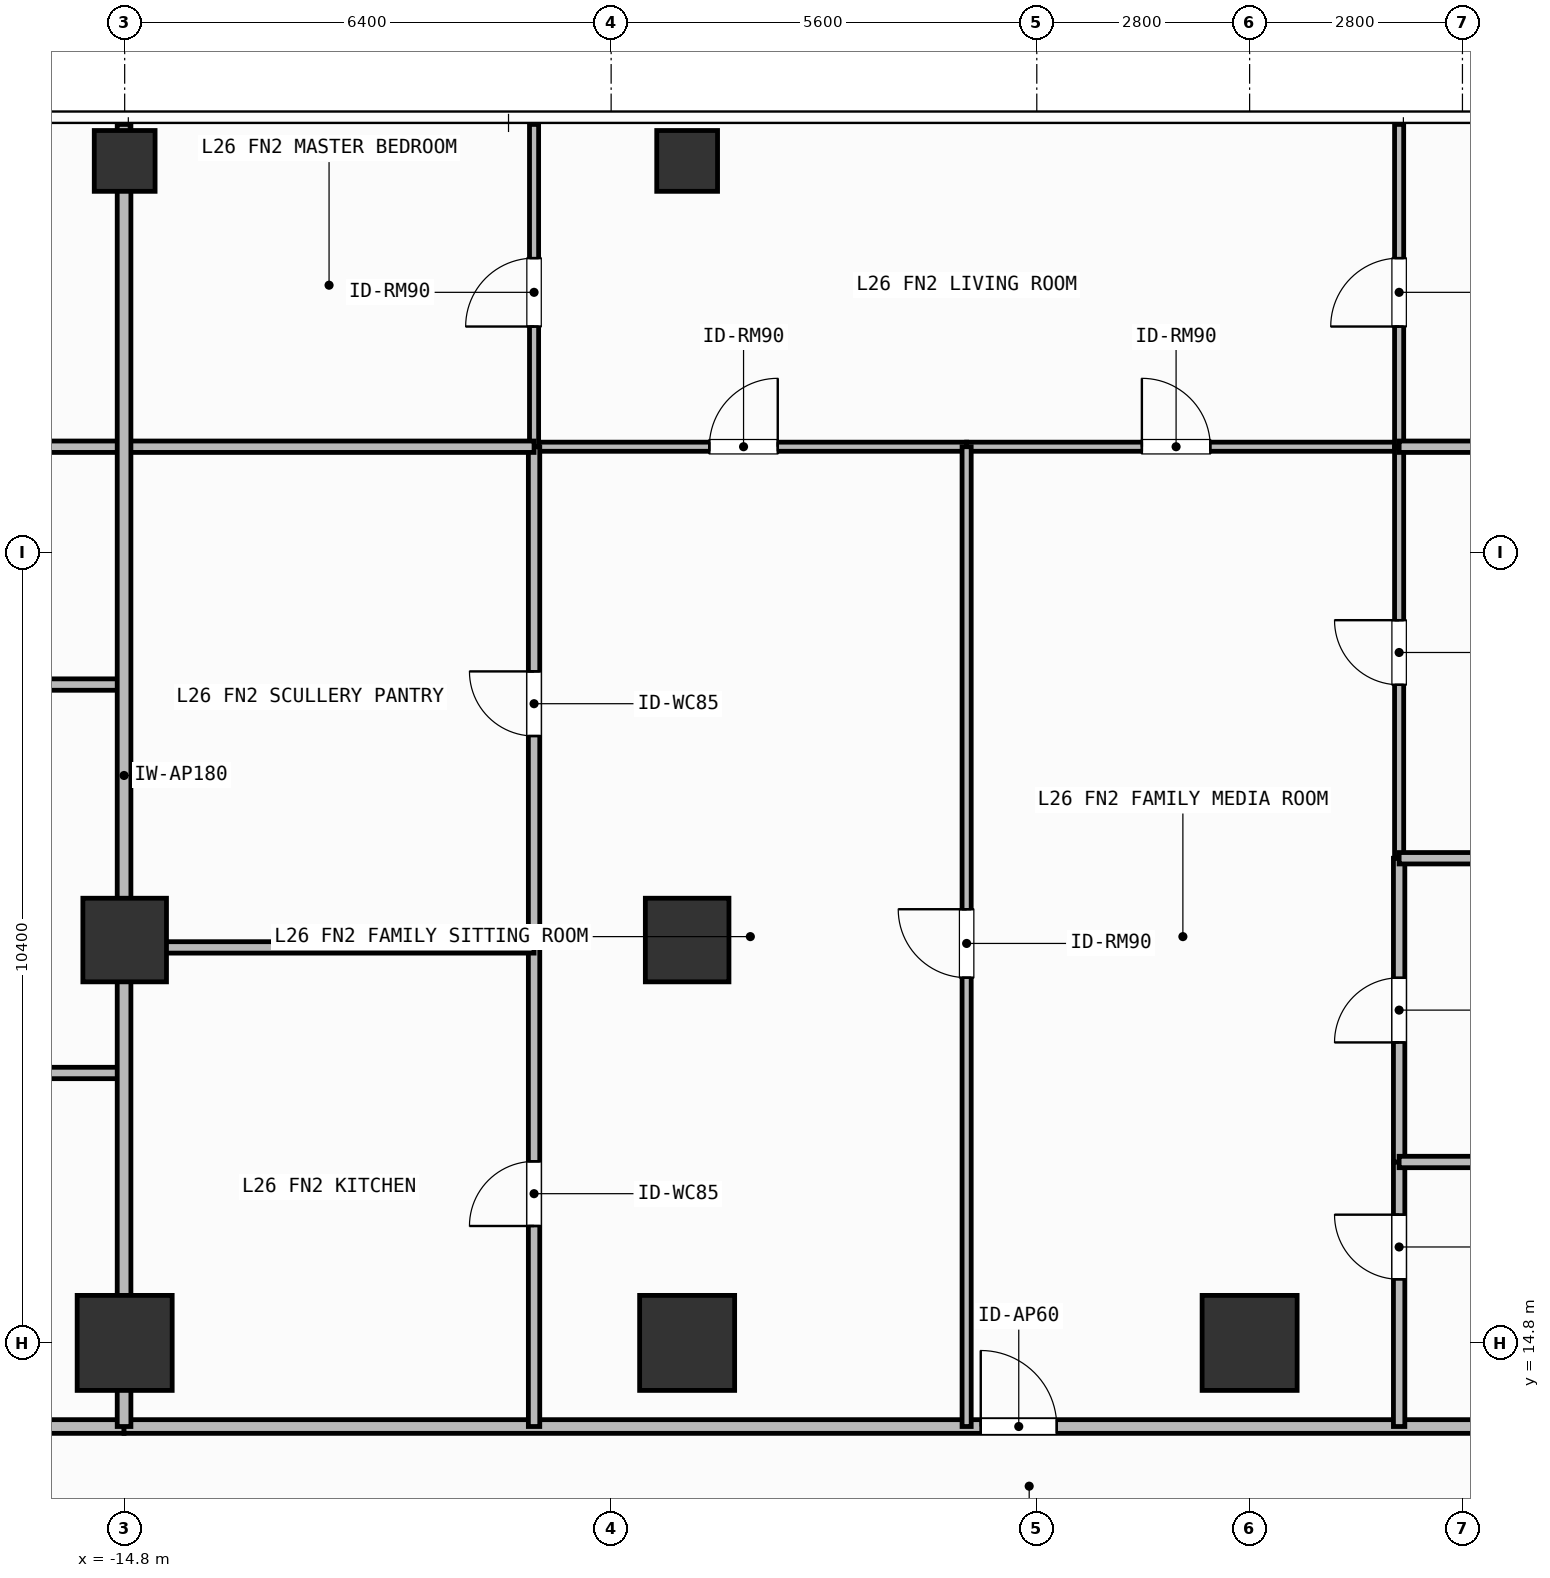
"""IFC4 building model, lengths in metres.
Left out: names, types, materials, properties, quantities, classifications, styles, units other than length and angle.
Written with IfcOpenShell. Run it as: python <this file> out.ifc"""

import sys

from ifc_helpers import new_model, si_unit, direction, frame, frame_2d, origin, origin_2d, place, context, subcontext, project, spatial, rectangle, hollow_rectangle, extrude, element, fill, save


model = new_model("IFC4")
c1 = context("Model", 3, precision=1e-05, world=origin(), true_north=direction((0.0, 1.0)))
c2 = subcontext(c1, "Body", "Model", "MODEL_VIEW")
j1 = project(units=[si_unit("LENGTHUNIT", "METRE"), si_unit("PLANEANGLEUNIT", "RADIAN")], contexts=[c1])
p1 = place(None, origin())
s1 = spatial("IfcSite", under=j1, at=p1, CompositionType="ELEMENT")
p2 = place(p1, origin())
s2 = spatial("IfcBuilding", under=s1, at=p2, CompositionType="ELEMENT")
p3 = place(p2, frame((0.0, 0.0, 104.7)))
s3 = spatial("IfcBuildingStorey", under=s2, at=p3, CompositionType="ELEMENT", Elevation=104.7)
for number, where, z_axis, x_axis in (
    (1, (-14.8, 14.8, 0.0), (0.0, 0.0, 1.0), (1.0, 0.0, 0.0)),
    (2, (-7.4, 14.8, 0.0), (0.0, 0.0, 1.0), (1.0, 0.0, 0.0)),
    (3, (0.0, 14.8, 0.0), (0.0, 0.0, 1.0), (1.0, 0.0, 0.0)),
):
    element("IfcColumn", number, at=place(p3, frame(where, z_axis=z_axis, x_axis=x_axis)), inside=s3, PredefinedType="COLUMN", context=c2, shape_type="SweptSolid", body=[
        extrude(rectangle(XDim=1.25, YDim=1.25, at=origin_2d()), origin(), (0.0, 0.0, 1.0), 3.9),
    ])
for number, where, z_axis, x_axis in (
    (4, (-14.8, 20.1, 0.0), (0.0, 0.0, 1.0), (1.0, 0.0, 0.0)),
    (5, (-7.4, 20.1, 0.0), (0.0, 0.0, 1.0), (1.0, 0.0, 0.0)),
):
    element("IfcColumn", number, at=place(p3, frame(where, z_axis=z_axis, x_axis=x_axis)), inside=s3, PredefinedType="COLUMN", context=c2, shape_type="SweptSolid", body=[
        extrude(rectangle(XDim=1.1, YDim=1.1, at=origin_2d()), origin(), (0.0, 0.0, 1.0), 3.9),
    ])
for number, where, z_axis, x_axis in (
    (6, (-14.8, 30.35, 0.0), (0.0, 0.0, 1.0), (1.0, 0.0, 0.0)),
    (7, (-7.4, 30.35, 0.0), (0.0, 0.0, 1.0), (1.0, 0.0, 0.0)),
):
    element("IfcColumn", number, at=place(p3, frame(where, z_axis=z_axis, x_axis=x_axis)), inside=s3, PredefinedType="COLUMN", context=c2, shape_type="SweptSolid", body=[
        extrude(hollow_rectangle(XDim=0.8, YDim=0.8, WallThickness=0.036, at=origin_2d()), origin(), (0.0, 0.0, 1.0), 3.9),
    ])
p4 = place(p3, frame((-24.42, 13.7, 0.0), z_axis=(0.0, 0.0, 1.0), x_axis=(1.0, 0.0, 0.0)))
e8 = element("IfcWall", 8, at=p4, inside=s3, PredefinedType="PARTITIONING", context=c2, shape_type="SweptSolid", body=[
    extrude(rectangle(XDim=9.612, YDim=0.18, at=frame_2d((4.806, 0.0))), origin(), (0.0, 0.0, 1.0), 3.62),
])
p5 = place(p4, frame((1.748, 0.0, 0.0)))
e9 = element("IfcOpeningElement", 9, at=p5, cuts=e8, PredefinedType="OPENING", context=c2, shape_type="SweptSolid", body=[
    extrude(rectangle(XDim=1.0, YDim=2.2, at=frame_2d((0.5, 1.1))), frame((0.0, 0.1, 0.0), z_axis=(0.0, -1.0, 0.0), x_axis=(1.0, 0.0, 0.0)), (0.0, 0.0, 1.0), 0.2),
])
p6 = place(p3, frame((-14.808, 13.7, 0.0), z_axis=(0.0, 0.0, 1.0), x_axis=(1.0, 0.0, 0.0)))
e10 = element("IfcWall", 10, at=p6, inside=s3, PredefinedType="PARTITIONING", context=c2, shape_type="SweptSolid", body=[
    extrude(rectangle(XDim=21.212, YDim=0.18, at=frame_2d((10.606, 0.0))), origin(), (0.0, 0.0, 1.0), 3.62),
])
p7 = place(p6, frame((11.271, 0.0, 0.0)))
e11 = element("IfcOpeningElement", 11, at=p7, cuts=e10, PredefinedType="OPENING", context=c2, shape_type="SweptSolid", body=[
    extrude(rectangle(XDim=1.0, YDim=2.2, at=frame_2d((0.5, 1.1))), frame((0.0, 0.1, 0.0), z_axis=(0.0, -1.0, 0.0), x_axis=(1.0, 0.0, 0.0)), (0.0, 0.0, 1.0), 0.2),
])
p8 = place(p3, frame((-9.414, 26.59, 0.0), z_axis=(0.0, 0.0, 1.0), x_axis=(1.0, 0.0, 0.0)))
e12 = element("IfcWall", 12, at=p8, inside=s3, PredefinedType="PARTITIONING", context=c2, shape_type="SweptSolid", body=[
    extrude(rectangle(XDim=5.691, YDim=0.12, at=frame_2d((2.846, 0.0))), origin(), (0.0, 0.0, 1.0), 3.62),
])
p9 = place(p8, frame((2.306, 0.0, 0.0)))
e13 = element("IfcOpeningElement", 13, at=p9, cuts=e12, PredefinedType="OPENING", context=c2, shape_type="SweptSolid", body=[
    extrude(rectangle(XDim=0.9, YDim=2.1, at=frame_2d((0.45, 1.05))), frame((0.0, 0.07, 0.0), z_axis=(0.0, -1.0, 0.0), x_axis=(1.0, 0.0, 0.0)), (0.0, 0.0, 1.0), 0.14),
])
p10 = place(p3, frame((-3.723, 26.59, 0.0), z_axis=(0.0, 0.0, 1.0), x_axis=(1.0, 0.0, 0.0)))
e14 = element("IfcWall", 14, at=p10, inside=s3, PredefinedType="PARTITIONING", context=c2, shape_type="SweptSolid", body=[
    extrude(rectangle(XDim=5.69, YDim=0.12, at=frame_2d((2.845, 0.0))), origin(), (0.0, 0.0, 1.0), 3.62),
])
p11 = place(p10, frame((2.306, 0.0, 0.0)))
e15 = element("IfcOpeningElement", 15, at=p11, cuts=e14, PredefinedType="OPENING", context=c2, shape_type="SweptSolid", body=[
    extrude(rectangle(XDim=0.9, YDim=2.1, at=frame_2d((0.45, 1.05))), frame((0.0, 0.07, 0.0), z_axis=(0.0, -1.0, 0.0), x_axis=(1.0, 0.0, 0.0)), (0.0, 0.0, 1.0), 0.14),
])
p12 = place(p3, frame((-3.723, 13.7, 0.0), z_axis=(0.0, 0.0, 1.0), x_axis=(0.0, 1.0, 0.0)))
e16 = element("IfcWall", 16, at=p12, inside=s3, PredefinedType="PARTITIONING", context=c2, shape_type="SweptSolid", body=[
    extrude(rectangle(XDim=12.89, YDim=0.12, at=frame_2d((6.445, 0.0))), origin(), (0.0, 0.0, 1.0), 3.62),
])
p13 = place(p12, frame((5.905, 0.0, 0.0)))
e17 = element("IfcOpeningElement", 17, at=p13, cuts=e16, PredefinedType="OPENING", context=c2, shape_type="SweptSolid", body=[
    extrude(rectangle(XDim=0.9, YDim=2.1, at=frame_2d((0.45, 1.05))), frame((0.0, 0.07, 0.0), z_axis=(0.0, -1.0, 0.0), x_axis=(1.0, 0.0, 0.0)), (0.0, 0.0, 1.0), 0.14),
])
p14 = place(p3, frame((-9.414, 13.7, 0.0), z_axis=(0.0, 0.0, 1.0), x_axis=(0.0, 1.0, 0.0)))
e18 = element("IfcWall", 18, at=p14, inside=s3, PredefinedType="PARTITIONING", context=c2, shape_type="SweptSolid", body=[
    extrude(rectangle(XDim=6.303, YDim=0.15, at=frame_2d((3.151, 0.0))), origin(), (0.0, 0.0, 1.0), 3.62),
])
p15 = place(p14, frame((2.638, 0.0, 0.0)))
e19 = element("IfcOpeningElement", 19, at=p15, cuts=e18, PredefinedType="OPENING", context=c2, shape_type="SweptSolid", body=[
    extrude(rectangle(XDim=0.85, YDim=2.1, at=frame_2d((0.425, 1.05))), frame((0.0, 0.085, 0.0), z_axis=(0.0, -1.0, 0.0), x_axis=(1.0, 0.0, 0.0)), (0.0, 0.0, 1.0), 0.17),
])
p16 = place(p3, frame((-9.414, 20.003, 0.0), z_axis=(0.0, 0.0, 1.0), x_axis=(0.0, 1.0, 0.0)))
e20 = element("IfcWall", 20, at=p16, inside=s3, PredefinedType="PARTITIONING", context=c2, shape_type="SweptSolid", body=[
    extrude(rectangle(XDim=6.587, YDim=0.15, at=frame_2d((3.293, 0.0))), origin(), (0.0, 0.0, 1.0), 3.62),
])
p17 = place(p16, frame((2.781, 0.0, 0.0)))
e21 = element("IfcOpeningElement", 21, at=p17, cuts=e20, PredefinedType="OPENING", context=c2, shape_type="SweptSolid", body=[
    extrude(rectangle(XDim=0.85, YDim=2.1, at=frame_2d((0.425, 1.05))), frame((0.0, 0.085, 0.0), z_axis=(0.0, -1.0, 0.0), x_axis=(1.0, 0.0, 0.0)), (0.0, 0.0, 1.0), 0.17),
])
p18 = place(p3, frame((-9.414, 26.59, 0.0), z_axis=(0.0, 0.0, 1.0), x_axis=(0.0, 1.0, 0.0)))
e22 = element("IfcWall", 22, at=p18, inside=s3, PredefinedType="PARTITIONING", context=c2, shape_type="SweptSolid", body=[
    extrude(rectangle(XDim=4.24, YDim=0.12, at=frame_2d((2.12, 0.0))), origin(), (0.0, 0.0, 1.0), 3.62),
])
p19 = place(p18, frame((1.581, 0.0, 0.0)))
e23 = element("IfcOpeningElement", 23, at=p19, cuts=e22, PredefinedType="OPENING", context=c2, shape_type="SweptSolid", body=[
    extrude(rectangle(XDim=0.9, YDim=2.1, at=frame_2d((0.45, 1.05))), frame((0.0, 0.07, 0.0), z_axis=(0.0, -1.0, 0.0), x_axis=(1.0, 0.0, 0.0)), (0.0, 0.0, 1.0), 0.14),
])
p20 = place(p3, frame((1.967, 13.7, 0.0), z_axis=(0.0, 0.0, 1.0), x_axis=(0.0, 1.0, 0.0)))
e24 = element("IfcWall", 24, at=p20, inside=s3, PredefinedType="PARTITIONING", context=c2, shape_type="SweptSolid", body=[
    extrude(rectangle(XDim=3.48, YDim=0.15, at=frame_2d((1.74, 0.0))), origin(), (0.0, 0.0, 1.0), 3.62),
])
p21 = place(p20, frame((1.937, 0.0, 0.0)))
e25 = element("IfcOpeningElement", 25, at=p21, cuts=e24, PredefinedType="OPENING", context=c2, shape_type="SweptSolid", body=[
    extrude(rectangle(XDim=0.85, YDim=2.1, at=frame_2d((0.425, 1.05))), frame((0.0, 0.085, 0.0), z_axis=(0.0, -1.0, 0.0), x_axis=(1.0, 0.0, 0.0)), (0.0, 0.0, 1.0), 0.17),
])
p22 = place(p3, frame((1.967, 17.18, 0.0), z_axis=(0.0, 0.0, 1.0), x_axis=(0.0, 1.0, 0.0)))
e26 = element("IfcWall", 26, at=p22, inside=s3, PredefinedType="PARTITIONING", context=c2, shape_type="SweptSolid", body=[
    extrude(rectangle(XDim=3.996, YDim=0.15, at=frame_2d((1.998, 0.0))), origin(), (0.0, 0.0, 1.0), 3.62),
])
p23 = place(p22, frame((1.573, 0.0, 0.0)))
e27 = element("IfcOpeningElement", 27, at=p23, cuts=e26, PredefinedType="OPENING", context=c2, shape_type="SweptSolid", body=[
    extrude(rectangle(XDim=0.85, YDim=2.1, at=frame_2d((0.425, 1.05))), frame((0.0, 0.085, 0.0), z_axis=(0.0, -1.0, 0.0), x_axis=(1.0, 0.0, 0.0)), (0.0, 0.0, 1.0), 0.17),
])
p24 = place(p3, frame((1.967, 21.176, 0.0), z_axis=(0.0, 0.0, 1.0), x_axis=(0.0, 1.0, 0.0)))
e28 = element("IfcWall", 28, at=p24, inside=s3, PredefinedType="PARTITIONING", context=c2, shape_type="SweptSolid", body=[
    extrude(rectangle(XDim=5.414, YDim=0.12, at=frame_2d((2.707, 0.0))), origin(), (0.0, 0.0, 1.0), 3.62),
])
p25 = place(p24, frame((2.282, 0.0, 0.0)))
e29 = element("IfcOpeningElement", 29, at=p25, cuts=e28, PredefinedType="OPENING", context=c2, shape_type="SweptSolid", body=[
    extrude(rectangle(XDim=0.85, YDim=2.1, at=frame_2d((0.425, 1.05))), frame((0.0, 0.07, 0.0), z_axis=(0.0, -1.0, 0.0), x_axis=(1.0, 0.0, 0.0)), (0.0, 0.0, 1.0), 0.14),
])
p26 = place(p3, frame((1.967, 26.59, 0.0), z_axis=(0.0, 0.0, 1.0), x_axis=(0.0, 1.0, 0.0)))
e30 = element("IfcWall", 30, at=p26, inside=s3, PredefinedType="PARTITIONING", context=c2, shape_type="SweptSolid", body=[
    extrude(rectangle(XDim=4.24, YDim=0.12, at=frame_2d((2.12, 0.0))), origin(), (0.0, 0.0, 1.0), 3.62),
])
p27 = place(p26, frame((1.581, 0.0, 0.0)))
e31 = element("IfcOpeningElement", 31, at=p27, cuts=e30, PredefinedType="OPENING", context=c2, shape_type="SweptSolid", body=[
    extrude(rectangle(XDim=0.9, YDim=2.1, at=frame_2d((0.45, 1.05))), frame((0.0, 0.07, 0.0), z_axis=(0.0, -1.0, 0.0), x_axis=(1.0, 0.0, 0.0)), (0.0, 0.0, 1.0), 0.14),
])
for number, where, z_axis, x_axis in (
    (32, (-20.721, 18.351, 0.0), (0.0, 0.0, 1.0), (1.0, 0.0, 0.0)),
    (33, (-20.721, 23.461, 0.0), (0.0, 0.0, 1.0), (1.0, 0.0, 0.0)),
    (34, (-20.721, 26.59, 0.0), (0.0, 0.0, 1.0), (1.0, 0.0, 0.0)),
):
    element("IfcWall", number, at=place(p3, frame(where, z_axis=z_axis, x_axis=x_axis)), inside=s3, PredefinedType="PARTITIONING", context=c2, shape_type="SweptSolid", body=[
        extrude(rectangle(XDim=5.913, YDim=0.15, at=frame_2d((2.957, 0.0))), origin(), (0.0, 0.0, 1.0), 3.62),
    ])
p28 = place(p3, frame((-14.808, 20.003, 0.0), z_axis=(0.0, 0.0, 1.0), x_axis=(1.0, 0.0, 0.0)))
e35 = element("IfcWall", 35, at=p28, inside=s3, PredefinedType="PARTITIONING", context=c2, shape_type="SweptSolid", body=[
    extrude(rectangle(XDim=5.394, YDim=0.15, at=frame_2d((2.697, 0.0))), origin(), (0.0, 0.0, 1.0), 2.71),
])
p29 = place(p3, frame((-14.808, 26.59, 0.0), z_axis=(0.0, 0.0, 1.0), x_axis=(1.0, 0.0, 0.0)))
e36 = element("IfcWall", 36, at=p29, inside=s3, PredefinedType="PARTITIONING", context=c2, shape_type="SweptSolid", body=[
    extrude(rectangle(XDim=5.394, YDim=0.15, at=frame_2d((2.697, 0.0))), origin(), (0.0, 0.0, 1.0), 3.62),
])
for number, where, z_axis, x_axis in (
    (37, (1.967, 17.18, 0.0), (0.0, 0.0, 1.0), (1.0, 0.0, 0.0)),
    (38, (1.967, 21.176, 0.0), (0.0, 0.0, 1.0), (1.0, 0.0, 0.0)),
    (39, (1.967, 26.59, 0.0), (0.0, 0.0, 1.0), (1.0, 0.0, 0.0)),
):
    element("IfcWall", number, at=place(p3, frame(where, z_axis=z_axis, x_axis=x_axis)), inside=s3, PredefinedType="PARTITIONING", context=c2, shape_type="SweptSolid", body=[
        extrude(rectangle(XDim=4.437, YDim=0.15, at=frame_2d((2.219, 0.0))), origin(), (0.0, 0.0, 1.0), 3.62),
    ])
p30 = place(p3, frame((-14.808, 13.7, 0.0), z_axis=(0.0, 0.0, 1.0), x_axis=(0.0, 1.0, 0.0)))
e40 = element("IfcWall", 40, at=p30, inside=s3, PredefinedType="PARTITIONING", context=c2, shape_type="SweptSolid", body=[
    extrude(rectangle(XDim=17.13, YDim=0.18, at=frame_2d((8.565, 0.0))), origin(), (0.0, 0.0, 1.0), 2.71),
])
p31 = place(p7, origin())
e41 = element("IfcDoor", 41, at=p31, inside=s3, OperationType="SINGLE_SWING_LEFT", PredefinedType="DOOR", context=c2, shape_type="SweptSolid", body=[
    extrude(rectangle(XDim=1.0, YDim=2.2, at=frame_2d((0.5, 1.1))), frame((0.0, 0.025, 0.0), z_axis=(0.0, -1.0, 0.0), x_axis=(1.0, 0.0, 0.0)), (0.0, 0.0, 1.0), 0.05),
])
fill(e11, e41)
p32 = place(p9, origin())
e42 = element("IfcDoor", 42, at=p32, inside=s3, OperationType="SINGLE_SWING_RIGHT", PredefinedType="DOOR", context=c2, shape_type="SweptSolid", body=[
    extrude(rectangle(XDim=0.9, YDim=2.1, at=frame_2d((0.45, 1.05))), frame((0.0, 0.025, 0.0), z_axis=(0.0, -1.0, 0.0), x_axis=(1.0, 0.0, 0.0)), (0.0, 0.0, 1.0), 0.05),
])
fill(e13, e42)
p33 = place(p11, origin())
e43 = element("IfcDoor", 43, at=p33, inside=s3, OperationType="SINGLE_SWING_LEFT", PredefinedType="DOOR", context=c2, shape_type="SweptSolid", body=[
    extrude(rectangle(XDim=0.9, YDim=2.1, at=frame_2d((0.45, 1.05))), frame((0.0, 0.025, 0.0), z_axis=(0.0, -1.0, 0.0), x_axis=(1.0, 0.0, 0.0)), (0.0, 0.0, 1.0), 0.05),
])
fill(e15, e43)
p34 = place(p13, origin())
e44 = element("IfcDoor", 44, at=p34, inside=s3, OperationType="SINGLE_SWING_RIGHT", PredefinedType="DOOR", context=c2, shape_type="SweptSolid", body=[
    extrude(rectangle(XDim=0.9, YDim=2.1, at=frame_2d((0.45, 1.05))), frame((0.0, 0.025, 0.0), z_axis=(0.0, -1.0, 0.0), x_axis=(1.0, 0.0, 0.0)), (0.0, 0.0, 1.0), 0.05),
])
fill(e17, e44)
p35 = place(p15, origin())
e45 = element("IfcDoor", 45, at=p35, inside=s3, OperationType="SINGLE_SWING_LEFT", PredefinedType="DOOR", context=c2, shape_type="SweptSolid", body=[
    extrude(rectangle(XDim=0.85, YDim=2.1, at=frame_2d((0.425, 1.05))), frame((0.0, 0.025, 0.0), z_axis=(0.0, -1.0, 0.0), x_axis=(1.0, 0.0, 0.0)), (0.0, 0.0, 1.0), 0.05),
])
fill(e19, e45)
p36 = place(p17, origin())
e46 = element("IfcDoor", 46, at=p36, inside=s3, OperationType="SINGLE_SWING_RIGHT", PredefinedType="DOOR", context=c2, shape_type="SweptSolid", body=[
    extrude(rectangle(XDim=0.85, YDim=2.1, at=frame_2d((0.425, 1.05))), frame((0.0, 0.025, 0.0), z_axis=(0.0, -1.0, 0.0), x_axis=(1.0, 0.0, 0.0)), (0.0, 0.0, 1.0), 0.05),
])
fill(e21, e46)
p37 = place(p19, origin())
e47 = element("IfcDoor", 47, at=p37, inside=s3, OperationType="SINGLE_SWING_LEFT", PredefinedType="DOOR", context=c2, shape_type="SweptSolid", body=[
    extrude(rectangle(XDim=0.9, YDim=2.1, at=frame_2d((0.45, 1.05))), frame((0.0, 0.025, 0.0), z_axis=(0.0, -1.0, 0.0), x_axis=(1.0, 0.0, 0.0)), (0.0, 0.0, 1.0), 0.05),
])
fill(e23, e47)
p38 = place(p21, origin())
e48 = element("IfcDoor", 48, at=p38, inside=s3, OperationType="SINGLE_SWING_RIGHT", PredefinedType="DOOR", context=c2, shape_type="SweptSolid", body=[
    extrude(rectangle(XDim=0.85, YDim=2.1, at=frame_2d((0.425, 1.05))), frame((0.0, 0.025, 0.0), z_axis=(0.0, -1.0, 0.0), x_axis=(1.0, 0.0, 0.0)), (0.0, 0.0, 1.0), 0.05),
])
fill(e25, e48)
p39 = place(p23, origin())
e49 = element("IfcDoor", 49, at=p39, inside=s3, OperationType="SINGLE_SWING_LEFT", PredefinedType="DOOR", context=c2, shape_type="SweptSolid", body=[
    extrude(rectangle(XDim=0.85, YDim=2.1, at=frame_2d((0.425, 1.05))), frame((0.0, 0.025, 0.0), z_axis=(0.0, -1.0, 0.0), x_axis=(1.0, 0.0, 0.0)), (0.0, 0.0, 1.0), 0.05),
])
fill(e27, e49)
p40 = place(p25, origin())
e50 = element("IfcDoor", 50, at=p40, inside=s3, OperationType="SINGLE_SWING_RIGHT", PredefinedType="DOOR", context=c2, shape_type="SweptSolid", body=[
    extrude(rectangle(XDim=0.85, YDim=2.1, at=frame_2d((0.425, 1.05))), frame((0.0, 0.025, 0.0), z_axis=(0.0, -1.0, 0.0), x_axis=(1.0, 0.0, 0.0)), (0.0, 0.0, 1.0), 0.05),
])
fill(e29, e50)
p41 = place(p27, origin())
e51 = element("IfcDoor", 51, at=p41, inside=s3, OperationType="SINGLE_SWING_LEFT", PredefinedType="DOOR", context=c2, shape_type="SweptSolid", body=[
    extrude(rectangle(XDim=0.9, YDim=2.1, at=frame_2d((0.45, 1.05))), frame((0.0, 0.025, 0.0), z_axis=(0.0, -1.0, 0.0), x_axis=(1.0, 0.0, 0.0)), (0.0, 0.0, 1.0), 0.05),
])
fill(e31, e51)
save(model, sys.argv[1])
